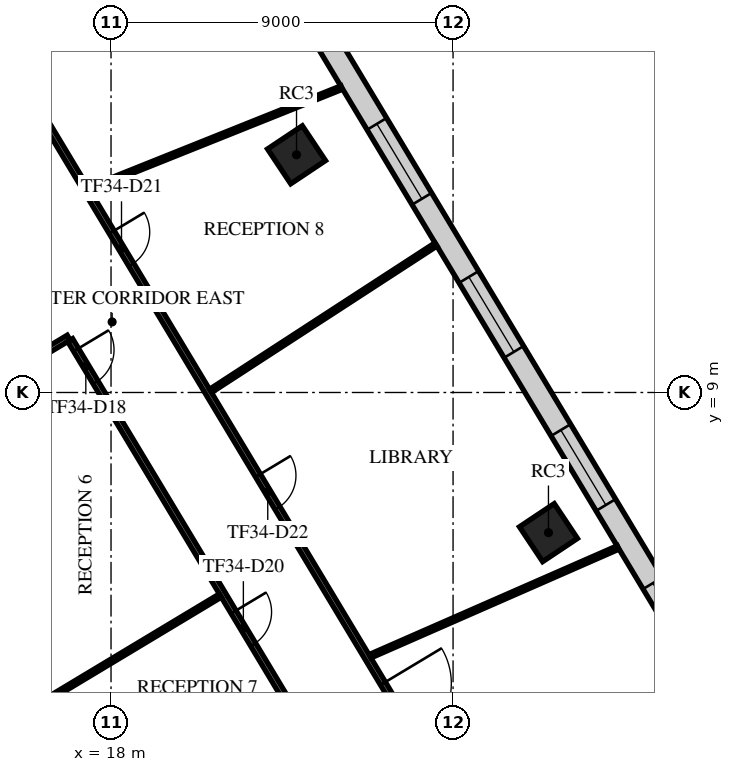
"""IFC4 building model, lengths in metres.
Left out: names, types, materials, properties, quantities, classifications, styles, units other than length and angle.
Written with IfcOpenShell. Run it as: python <this file> out.ifc"""

import sys

from ifc_helpers import new_model, si_unit, direction, frame, frame_2d, origin, origin_2d, place, context, subcontext, project, spatial, rectangle, extrude, element, fill, save


model = new_model("IFC4")
c1 = context("Model", 3, precision=1e-05, world=origin(), true_north=direction((0.0, 1.0)))
c2 = subcontext(c1, "Body", "Model", "MODEL_VIEW")
j1 = project(units=[si_unit("LENGTHUNIT", "METRE"), si_unit("PLANEANGLEUNIT", "RADIAN")], contexts=[c1])
p1 = place(None, origin())
s1 = spatial("IfcSite", under=j1, at=p1, CompositionType="ELEMENT")
p2 = place(p1, origin())
s2 = spatial("IfcBuilding", under=s1, at=p2, CompositionType="ELEMENT")
p3 = place(p2, frame((0.0, 0.0, 147.7)))
s3 = spatial("IfcBuildingStorey", under=s2, at=p3, CompositionType="ELEMENT", Elevation=147.7)
for number, where, z_axis, x_axis in (
    (1, (29.51, 5.312, 0.0), (0.0, 0.0, 1.0), (0.832, 0.555, 0.0)),
    (2, (22.881, 15.255, 0.0), (0.0, 0.0, 1.0), (0.832, 0.555, 0.0)),
):
    element("IfcColumn", number, at=place(p3, frame(where, z_axis=z_axis, x_axis=x_axis)), inside=s3, PredefinedType="COLUMN", context=c2, shape_type="SweptSolid", body=[
        extrude(rectangle(XDim=1.1, YDim=1.1, at=origin_2d()), origin(), (0.0, 0.0, 1.0), 4.0),
    ])
p4 = place(p3, frame((36.416, -2.94, 0.0), z_axis=(0.0, 0.0, 1.0), x_axis=(-0.515039615037, 0.857166375299, 0.0)))
e3 = element("IfcWall", 3, at=p4, inside=s3, PredefinedType="STANDARD", context=c2, shape_type="SweptSolid", body=[
    extrude(rectangle(XDim=42.176, YDim=0.6, at=frame_2d((21.088, 0.0))), origin(), (0.0, 0.0, 1.0), 3.6),
])
p5 = place(p4, frame((1.138, 0.0, 0.9)))
e4 = element("IfcOpeningElement", 4, at=p5, cuts=e3, PredefinedType="OPENING", context=c2, shape_type="SweptSolid", body=[
    extrude(rectangle(XDim=2.3, YDim=2.1, at=frame_2d((1.15, 1.05))), frame((0.0, 0.31, 0.0), z_axis=(0.0, -1.0, 0.0), x_axis=(1.0, 0.0, 0.0)), (0.0, 0.0, 1.0), 0.62),
])
p6 = place(p4, frame((5.776, 0.0, 0.9)))
e5 = element("IfcOpeningElement", 5, at=p6, cuts=e3, PredefinedType="OPENING", context=c2, shape_type="SweptSolid", body=[
    extrude(rectangle(XDim=2.3, YDim=2.1, at=frame_2d((1.15, 1.05))), frame((0.0, 0.31, 0.0), z_axis=(0.0, -1.0, 0.0), x_axis=(1.0, 0.0, 0.0)), (0.0, 0.0, 1.0), 0.62),
])
p7 = place(p4, frame((10.476, 0.0, 0.9)))
e6 = element("IfcOpeningElement", 6, at=p7, cuts=e3, PredefinedType="OPENING", context=c2, shape_type="SweptSolid", body=[
    extrude(rectangle(XDim=2.3, YDim=2.1, at=frame_2d((1.15, 1.05))), frame((0.0, 0.31, 0.0), z_axis=(0.0, -1.0, 0.0), x_axis=(1.0, 0.0, 0.0)), (0.0, 0.0, 1.0), 0.62),
])
p8 = place(p4, frame((15.176, 0.0, 0.9)))
e7 = element("IfcOpeningElement", 7, at=p8, cuts=e3, PredefinedType="OPENING", context=c2, shape_type="SweptSolid", body=[
    extrude(rectangle(XDim=2.3, YDim=2.1, at=frame_2d((1.15, 1.05))), frame((0.0, 0.31, 0.0), z_axis=(0.0, -1.0, 0.0), x_axis=(1.0, 0.0, 0.0)), (0.0, 0.0, 1.0), 0.62),
])
p9 = place(p4, frame((19.876, 0.0, 0.9)))
e8 = element("IfcOpeningElement", 8, at=p9, cuts=e3, PredefinedType="OPENING", context=c2, shape_type="SweptSolid", body=[
    extrude(rectangle(XDim=2.3, YDim=2.1, at=frame_2d((1.15, 1.05))), frame((0.0, 0.31, 0.0), z_axis=(0.0, -1.0, 0.0), x_axis=(1.0, 0.0, 0.0)), (0.0, 0.0, 1.0), 0.62),
])
p10 = place(p4, frame((24.576, 0.0, 0.9)))
e9 = element("IfcOpeningElement", 9, at=p10, cuts=e3, PredefinedType="OPENING", context=c2, shape_type="SweptSolid", body=[
    extrude(rectangle(XDim=2.3, YDim=2.1, at=frame_2d((1.15, 1.05))), frame((0.0, 0.31, 0.0), z_axis=(0.0, -1.0, 0.0), x_axis=(1.0, 0.0, 0.0)), (0.0, 0.0, 1.0), 0.62),
])
p11 = place(p4, frame((29.276, 0.0, 0.9)))
e10 = element("IfcOpeningElement", 10, at=p11, cuts=e3, PredefinedType="OPENING", context=c2, shape_type="SweptSolid", body=[
    extrude(rectangle(XDim=2.3, YDim=2.1, at=frame_2d((1.15, 1.05))), frame((0.0, 0.31, 0.0), z_axis=(0.0, -1.0, 0.0), x_axis=(1.0, 0.0, 0.0)), (0.0, 0.0, 1.0), 0.62),
])
p12 = place(p4, frame((33.976, 0.0, 0.9)))
e11 = element("IfcOpeningElement", 11, at=p12, cuts=e3, PredefinedType="OPENING", context=c2, shape_type="SweptSolid", body=[
    extrude(rectangle(XDim=2.3, YDim=2.1, at=frame_2d((1.15, 1.05))), frame((0.0, 0.31, 0.0), z_axis=(0.0, -1.0, 0.0), x_axis=(1.0, 0.0, 0.0)), (0.0, 0.0, 1.0), 0.62),
])
p13 = place(p4, frame((38.676, 0.0, 0.9)))
e12 = element("IfcOpeningElement", 12, at=p13, cuts=e3, PredefinedType="OPENING", context=c2, shape_type="SweptSolid", body=[
    extrude(rectangle(XDim=2.3, YDim=2.1, at=frame_2d((1.15, 1.05))), frame((0.0, 0.31, 0.0), z_axis=(0.0, -1.0, 0.0), x_axis=(1.0, 0.0, 0.0)), (0.0, 0.0, 1.0), 0.62),
])
p14 = place(p3, frame((11.76, 23.633, 0.0), z_axis=(0.0, 0.0, 1.0), x_axis=(0.515060503771, -0.857153823684, 0.0)))
e13 = element("IfcWall", 13, at=p14, inside=s3, PredefinedType="PARTITIONING", context=c2, shape_type="SweptSolid", body=[
    extrude(rectangle(XDim=28.475, YDim=0.15, at=frame_2d((14.238, 0.0))), origin(), (0.0, 0.0, 1.0), 3.15),
])
p15 = place(p14, frame((12.149, 0.0, 0.0)))
e14 = element("IfcOpeningElement", 14, at=p15, cuts=e13, PredefinedType="OPENING", context=c2, shape_type="SweptSolid", body=[
    extrude(rectangle(XDim=1.0, YDim=2.1, at=frame_2d((0.5, 1.05))), frame((0.0, 0.085, 0.0), z_axis=(0.0, -1.0, 0.0), x_axis=(1.0, 0.0, 0.0)), (0.0, 0.0, 1.0), 0.17),
])
p16 = place(p14, frame((19.62, 0.0, 0.0)))
e15 = element("IfcOpeningElement", 15, at=p16, cuts=e13, PredefinedType="OPENING", context=c2, shape_type="SweptSolid", body=[
    extrude(rectangle(XDim=1.0, YDim=2.1, at=frame_2d((0.5, 1.05))), frame((0.0, 0.085, 0.0), z_axis=(0.0, -1.0, 0.0), x_axis=(1.0, 0.0, 0.0)), (0.0, 0.0, 1.0), 0.17),
])
p17 = place(p14, frame((26.005, 0.0, 0.0)))
e16 = element("IfcOpeningElement", 16, at=p17, cuts=e13, PredefinedType="OPENING", context=c2, shape_type="SweptSolid", body=[
    extrude(rectangle(XDim=1.8, YDim=2.1, at=frame_2d((0.9, 1.05))), frame((0.0, 0.085, 0.0), z_axis=(0.0, -1.0, 0.0), x_axis=(1.0, 0.0, 0.0)), (0.0, 0.0, 1.0), 0.17),
])
p18 = place(p3, frame((15.514, 9.618, 0.0), z_axis=(0.0, 0.0, 1.0), x_axis=(0.857129434102, 0.515101090268, 0.0)))
e17 = element("IfcWall", 17, at=p18, inside=s3, PredefinedType="PARTITIONING", context=c2, shape_type="SweptSolid", body=[
    extrude(rectangle(XDim=1.601, YDim=0.15, at=frame_2d((0.801, 0.0))), origin(), (0.0, 0.0, 1.0), 3.15),
])
p19 = place(p3, frame((16.925, 10.379, 0.0), z_axis=(0.0, 0.0, 1.0), x_axis=(0.515094231421, -0.857133555962, 0.0)))
e18 = element("IfcWall", 18, at=p19, inside=s3, PredefinedType="PARTITIONING", context=c2, shape_type="SweptSolid", body=[
    extrude(rectangle(XDim=14.455, YDim=0.15, at=frame_2d((7.228, 0.0))), origin(), (0.0, 0.0, 1.0), 3.15),
])
p20 = place(p19, frame((0.3, 0.0, 0.0)))
e19 = element("IfcOpeningElement", 19, at=p20, cuts=e18, PredefinedType="OPENING", context=c2, shape_type="SweptSolid", body=[
    extrude(rectangle(XDim=1.0, YDim=2.1, at=frame_2d((0.5, 1.05))), frame((0.0, 0.085, 0.0), z_axis=(0.0, -1.0, 0.0), x_axis=(1.0, 0.0, 0.0)), (0.0, 0.0, 1.0), 0.17),
])
p21 = place(p19, frame((8.348, 0.0, 0.0)))
e20 = element("IfcOpeningElement", 20, at=p21, cuts=e18, PredefinedType="OPENING", context=c2, shape_type="SweptSolid", body=[
    extrude(rectangle(XDim=1.0, YDim=2.1, at=frame_2d((0.5, 1.05))), frame((0.0, 0.085, 0.0), z_axis=(0.0, -1.0, 0.0), x_axis=(1.0, 0.0, 0.0)), (0.0, 0.0, 1.0), 0.17),
])
p22 = place(p3, frame((15.501, 0.426, 0.0), z_axis=(0.0, 0.0, 1.0), x_axis=(0.857114899057, 0.515125275845, 0.0)))
e21 = element("IfcWall", 21, at=p22, inside=s3, PredefinedType="PARTITIONING", context=c2, shape_type="SweptSolid", body=[
    extrude(rectangle(XDim=6.272, YDim=0.1, at=frame_2d((3.136, 0.0))), origin(), (0.0, 0.0, 1.0), 3.15),
])
p23 = place(p3, frame((17.427, 14.364, 0.0), z_axis=(0.0, 0.0, 1.0), x_axis=(0.928344828439, 0.371720162906, 0.0)))
e22 = element("IfcWall", 22, at=p23, inside=s3, PredefinedType="PARTITIONING", context=c2, shape_type="SweptSolid", body=[
    extrude(rectangle(XDim=7.154, YDim=0.1, at=frame_2d((3.577, 0.0))), origin(), (0.0, 0.0, 1.0), 2.9),
])
p24 = place(p3, frame((20.618, 9.042, 0.0), z_axis=(0.0, 0.0, 1.0), x_axis=(0.838556384035, 0.544814822479, 0.0)))
e23 = element("IfcWall", 23, at=p24, inside=s3, PredefinedType="PARTITIONING", context=c2, shape_type="SweptSolid", body=[
    extrude(rectangle(XDim=7.072, YDim=0.1, at=frame_2d((3.536, 0.0))), origin(), (0.0, 0.0, 1.0), 2.9),
])
p25 = place(p3, frame((24.818, 2.061, 0.0), z_axis=(0.0, 0.0, 1.0), x_axis=(0.915839969102, 0.401543460905, 0.0)))
e24 = element("IfcWall", 24, at=p25, inside=s3, PredefinedType="PARTITIONING", context=c2, shape_type="SweptSolid", body=[
    extrude(rectangle(XDim=7.122, YDim=0.1, at=frame_2d((3.561, 0.0))), origin(), (0.0, 0.0, 1.0), 2.9),
])
p26 = place(p6, origin())
e25 = element("IfcWindow", 25, at=p26, inside=s3, PartitioningType="SINGLE_PANEL", PredefinedType="WINDOW", context=c2, shape_type="SweptSolid", body=[
    extrude(rectangle(XDim=2.3, YDim=2.1, at=frame_2d((1.15, 1.05))), frame((0.0, 0.03, 0.0), z_axis=(0.0, -1.0, 0.0), x_axis=(1.0, 0.0, 0.0)), (0.0, 0.0, 1.0), 0.06),
])
fill(e5, e25)
p27 = place(p7, origin())
e26 = element("IfcWindow", 26, at=p27, inside=s3, PartitioningType="SINGLE_PANEL", PredefinedType="WINDOW", context=c2, shape_type="SweptSolid", body=[
    extrude(rectangle(XDim=2.3, YDim=2.1, at=frame_2d((1.15, 1.05))), frame((0.0, 0.03, 0.0), z_axis=(0.0, -1.0, 0.0), x_axis=(1.0, 0.0, 0.0)), (0.0, 0.0, 1.0), 0.06),
])
fill(e6, e26)
p28 = place(p8, origin())
e27 = element("IfcWindow", 27, at=p28, inside=s3, PartitioningType="SINGLE_PANEL", PredefinedType="WINDOW", context=c2, shape_type="SweptSolid", body=[
    extrude(rectangle(XDim=2.3, YDim=2.1, at=frame_2d((1.15, 1.05))), frame((0.0, 0.03, 0.0), z_axis=(0.0, -1.0, 0.0), x_axis=(1.0, 0.0, 0.0)), (0.0, 0.0, 1.0), 0.06),
])
fill(e7, e27)
p29 = place(p9, origin())
e28 = element("IfcWindow", 28, at=p29, inside=s3, PartitioningType="SINGLE_PANEL", PredefinedType="WINDOW", context=c2, shape_type="SweptSolid", body=[
    extrude(rectangle(XDim=2.3, YDim=2.1, at=frame_2d((1.15, 1.05))), frame((0.0, 0.03, 0.0), z_axis=(0.0, -1.0, 0.0), x_axis=(1.0, 0.0, 0.0)), (0.0, 0.0, 1.0), 0.06),
])
fill(e8, e28)
p30 = place(p20, frame((1.0, 0.0, 0.0), z_axis=(0.0, 0.0, 1.0), x_axis=(-1.0, 0.0, 0.0)))
e29 = element("IfcDoor", 29, at=p30, inside=s3, OperationType="SINGLE_SWING_RIGHT", PredefinedType="DOOR", context=c2, shape_type="SweptSolid", body=[
    extrude(rectangle(XDim=1.0, YDim=2.1, at=frame_2d((0.5, 1.05))), frame((0.0, 0.025, 0.0), z_axis=(0.0, -1.0, 0.0), x_axis=(1.0, 0.0, 0.0)), (0.0, 0.0, 1.0), 0.05),
])
fill(e19, e29)
p31 = place(p21, frame((1.0, 0.0, 0.0), z_axis=(0.0, 0.0, 1.0), x_axis=(-1.0, 0.0, 0.0)))
e30 = element("IfcDoor", 30, at=p31, inside=s3, OperationType="SINGLE_SWING_RIGHT", PredefinedType="DOOR", context=c2, shape_type="SweptSolid", body=[
    extrude(rectangle(XDim=1.0, YDim=2.1, at=frame_2d((0.5, 1.05))), frame((0.0, 0.025, 0.0), z_axis=(0.0, -1.0, 0.0), x_axis=(1.0, 0.0, 0.0)), (0.0, 0.0, 1.0), 0.05),
])
fill(e20, e30)
p32 = place(p15, origin())
e31 = element("IfcDoor", 31, at=p32, inside=s3, OperationType="SINGLE_SWING_LEFT", PredefinedType="DOOR", context=c2, shape_type="SweptSolid", body=[
    extrude(rectangle(XDim=1.0, YDim=2.1, at=frame_2d((0.5, 1.05))), frame((0.0, 0.025, 0.0), z_axis=(0.0, -1.0, 0.0), x_axis=(1.0, 0.0, 0.0)), (0.0, 0.0, 1.0), 0.05),
])
fill(e14, e31)
p33 = place(p16, origin())
e32 = element("IfcDoor", 32, at=p33, inside=s3, OperationType="SINGLE_SWING_LEFT", PredefinedType="DOOR", context=c2, shape_type="SweptSolid", body=[
    extrude(rectangle(XDim=1.0, YDim=2.1, at=frame_2d((0.5, 1.05))), frame((0.0, 0.025, 0.0), z_axis=(0.0, -1.0, 0.0), x_axis=(1.0, 0.0, 0.0)), (0.0, 0.0, 1.0), 0.05),
])
fill(e15, e32)
p34 = place(p17, origin())
e33 = element("IfcDoor", 33, at=p34, inside=s3, OperationType="DOUBLE_DOOR_SINGLE_SWING", PredefinedType="DOOR", context=c2, shape_type="SweptSolid", body=[
    extrude(rectangle(XDim=1.8, YDim=2.1, at=frame_2d((0.9, 1.05))), frame((0.0, 0.025, 0.0), z_axis=(0.0, -1.0, 0.0), x_axis=(1.0, 0.0, 0.0)), (0.0, 0.0, 1.0), 0.05),
])
fill(e16, e33)
save(model, sys.argv[1])
